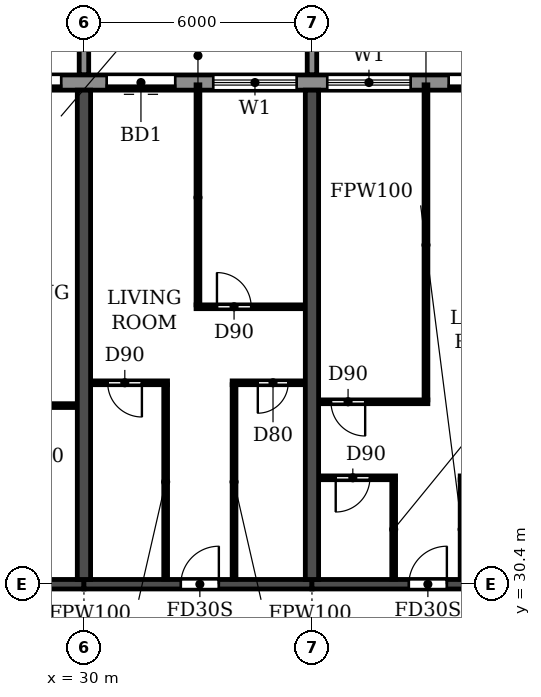
"""IFC4 building model, lengths in metres.
Left out: names, types, materials, properties, quantities, classifications, styles, units other than length and angle.
Written with IfcOpenShell. Run it as: python <this file> out.ifc"""

import sys

from ifc_helpers import new_model, si_unit, direction, frame, frame_2d, origin, place, context, subcontext, project, spatial, polyline, rectangle, outline, extrude, source, transform, mapped, element, fill, save


model = new_model("IFC4")
c1 = context("Model", 3, precision=1e-05, world=origin(), true_north=direction((0.0, 1.0)))
c2 = subcontext(c1, "Body", "Model", "MODEL_VIEW")
j1 = project(units=[si_unit("LENGTHUNIT", "METRE"), si_unit("PLANEANGLEUNIT", "RADIAN")], contexts=[c1])
p1 = place(None, origin())
s1 = spatial("IfcSite", under=j1, at=p1, CompositionType="ELEMENT")
p2 = place(p1, origin())
s2 = spatial("IfcBuilding", under=s1, at=p2, CompositionType="ELEMENT")
p3 = place(p2, frame((0.0, 0.0, 112.5)))
s3 = spatial("IfcBuildingStorey", under=s2, at=p3, CompositionType="ELEMENT", Elevation=112.5)
for number, where, z_axis, x_axis in (
    (1, (30.0, 30.525, 0.0), (0.0, 0.0, 1.0), (0.0, 1.0, 0.0)),
    (2, (36.0, 30.525, 0.0), (0.0, 0.0, 1.0), (0.0, 1.0, 0.0)),
):
    element("IfcWall", number, at=place(p3, frame(where, z_axis=z_axis, x_axis=x_axis)), inside=s3, PredefinedType="SHEAR", context=c2, shape_type="SweptSolid", body=[
        extrude(rectangle(XDim=12.875, YDim=0.35, at=frame_2d((6.438, 0.0))), origin(), (0.0, 0.0, 1.0), 2.95),
    ])
p4 = place(p3, frame((24.0, 30.4, 0.0), z_axis=(0.0, 0.0, 1.0), x_axis=(1.0, 0.0, 0.0)))
e3 = element("IfcWall", 3, at=p4, inside=s3, PredefinedType="SHEAR", context=c2, shape_type="SweptSolid", body=[
    extrude(rectangle(XDim=6.0, YDim=0.25, at=frame_2d((3.0, 0.0))), origin(), (0.0, 0.0, 1.0), 2.35),
])
p5 = place(p4, frame((2.55, 0.0, 0.0)))
e4 = element("IfcOpeningElement", 4, at=p5, cuts=e3, PredefinedType="OPENING", context=c2, shape_type="SweptSolid", body=[
    extrude(rectangle(XDim=1.0, YDim=2.1, at=frame_2d((0.5, 1.05))), frame((0.0, 0.135, 0.0), z_axis=(0.0, -1.0, 0.0), x_axis=(1.0, 0.0, 0.0)), (0.0, 0.0, 1.0), 0.27),
])
p6 = place(p3, frame((30.0, 30.4, 0.0), z_axis=(0.0, 0.0, 1.0), x_axis=(1.0, 0.0, 0.0)))
e5 = element("IfcWall", 5, at=p6, inside=s3, PredefinedType="SHEAR", context=c2, shape_type="SweptSolid", body=[
    extrude(rectangle(XDim=6.0, YDim=0.25, at=frame_2d((3.0, 0.0))), origin(), (0.0, 0.0, 1.0), 2.35),
])
p7 = place(p6, frame((2.55, 0.0, 0.0)))
e6 = element("IfcOpeningElement", 6, at=p7, cuts=e5, PredefinedType="OPENING", context=c2, shape_type="SweptSolid", body=[
    extrude(rectangle(XDim=1.0, YDim=2.1, at=frame_2d((0.5, 1.05))), frame((0.0, 0.135, 0.0), z_axis=(0.0, -1.0, 0.0), x_axis=(1.0, 0.0, 0.0)), (0.0, 0.0, 1.0), 0.27),
])
p8 = place(p3, frame((36.0, 30.4, 0.0), z_axis=(0.0, 0.0, 1.0), x_axis=(1.0, 0.0, 0.0)))
e7 = element("IfcWall", 7, at=p8, inside=s3, PredefinedType="SHEAR", context=c2, shape_type="SweptSolid", body=[
    extrude(rectangle(XDim=6.0, YDim=0.25, at=frame_2d((3.0, 0.0))), origin(), (0.0, 0.0, 1.0), 2.35),
])
p9 = place(p8, frame((2.55, 0.0, 0.0)))
e8 = element("IfcOpeningElement", 8, at=p9, cuts=e7, PredefinedType="OPENING", context=c2, shape_type="SweptSolid", body=[
    extrude(rectangle(XDim=1.0, YDim=2.1, at=frame_2d((0.5, 1.05))), frame((0.0, 0.135, 0.0), z_axis=(0.0, -1.0, 0.0), x_axis=(1.0, 0.0, 0.0)), (0.0, 0.0, 1.0), 0.27),
])
p10 = place(p3, frame((85.317, 43.6, 0.0), z_axis=(0.0, 0.0, 1.0), x_axis=(-1.0, 0.0, 0.0)))
e9 = element("IfcWall", 9, at=p10, inside=s3, PredefinedType="STANDARD", context=c2, shape_type="SweptSolid", body=[
    extrude(rectangle(XDim=68.634, YDim=0.4, at=frame_2d((34.317, 0.0))), origin(), (0.0, 0.0, 1.0), 2.95),
])
p11 = place(p10, frame((64.917, 0.0, 0.0)))
e10 = element("IfcOpeningElement", 10, at=p11, cuts=e9, PredefinedType="OPENING", context=c2, shape_type="SweptSolid", body=[
    extrude(rectangle(XDim=1.8, YDim=2.4, at=frame_2d((0.9, 1.2))), frame((0.0, 0.21, 0.0), z_axis=(0.0, -1.0, 0.0), x_axis=(1.0, 0.0, 0.0)), (0.0, 0.0, 1.0), 0.42),
])
p12 = place(p10, frame((61.717, 0.0, 0.9)))
e11 = element("IfcOpeningElement", 11, at=p12, cuts=e9, PredefinedType="OPENING", context=c2, shape_type="SweptSolid", body=[
    extrude(rectangle(XDim=2.2, YDim=1.5, at=frame_2d((1.1, 0.75))), frame((0.0, 0.21, 0.0), z_axis=(0.0, -1.0, 0.0), x_axis=(1.0, 0.0, 0.0)), (0.0, 0.0, 1.0), 0.42),
])
p13 = place(p10, frame((58.717, 0.0, 0.9)))
e12 = element("IfcOpeningElement", 12, at=p13, cuts=e9, PredefinedType="OPENING", context=c2, shape_type="SweptSolid", body=[
    extrude(rectangle(XDim=2.2, YDim=1.5, at=frame_2d((1.1, 0.75))), frame((0.0, 0.21, 0.0), z_axis=(0.0, -1.0, 0.0), x_axis=(1.0, 0.0, 0.0)), (0.0, 0.0, 1.0), 0.42),
])
p14 = place(p10, frame((55.917, 0.0, 0.0)))
e13 = element("IfcOpeningElement", 13, at=p14, cuts=e9, PredefinedType="OPENING", context=c2, shape_type="SweptSolid", body=[
    extrude(rectangle(XDim=1.8, YDim=2.4, at=frame_2d((0.9, 1.2))), frame((0.0, 0.21, 0.0), z_axis=(0.0, -1.0, 0.0), x_axis=(1.0, 0.0, 0.0)), (0.0, 0.0, 1.0), 0.42),
])
p15 = place(p10, frame((52.917, 0.0, 0.0)))
e14 = element("IfcOpeningElement", 14, at=p15, cuts=e9, PredefinedType="OPENING", context=c2, shape_type="SweptSolid", body=[
    extrude(rectangle(XDim=1.8, YDim=2.4, at=frame_2d((0.9, 1.2))), frame((0.0, 0.21, 0.0), z_axis=(0.0, -1.0, 0.0), x_axis=(1.0, 0.0, 0.0)), (0.0, 0.0, 1.0), 0.42),
])
p16 = place(p10, frame((49.717, 0.0, 0.9)))
e15 = element("IfcOpeningElement", 15, at=p16, cuts=e9, PredefinedType="OPENING", context=c2, shape_type="SweptSolid", body=[
    extrude(rectangle(XDim=2.2, YDim=1.5, at=frame_2d((1.1, 0.75))), frame((0.0, 0.21, 0.0), z_axis=(0.0, -1.0, 0.0), x_axis=(1.0, 0.0, 0.0)), (0.0, 0.0, 1.0), 0.42),
])
p17 = place(p10, frame((46.717, 0.0, 0.9)))
e16 = element("IfcOpeningElement", 16, at=p17, cuts=e9, PredefinedType="OPENING", context=c2, shape_type="SweptSolid", body=[
    extrude(rectangle(XDim=2.2, YDim=1.5, at=frame_2d((1.1, 0.75))), frame((0.0, 0.21, 0.0), z_axis=(0.0, -1.0, 0.0), x_axis=(1.0, 0.0, 0.0)), (0.0, 0.0, 1.0), 0.42),
])
p18 = place(p10, frame((43.917, 0.0, 0.0)))
e17 = element("IfcOpeningElement", 17, at=p18, cuts=e9, PredefinedType="OPENING", context=c2, shape_type="SweptSolid", body=[
    extrude(rectangle(XDim=1.8, YDim=2.4, at=frame_2d((0.9, 1.2))), frame((0.0, 0.21, 0.0), z_axis=(0.0, -1.0, 0.0), x_axis=(1.0, 0.0, 0.0)), (0.0, 0.0, 1.0), 0.42),
])
p19 = place(p10, frame((40.717, 0.0, 0.9)))
e18 = element("IfcOpeningElement", 18, at=p19, cuts=e9, PredefinedType="OPENING", context=c2, shape_type="SweptSolid", body=[
    extrude(rectangle(XDim=2.2, YDim=1.5, at=frame_2d((1.1, 0.75))), frame((0.0, 0.21, 0.0), z_axis=(0.0, -1.0, 0.0), x_axis=(1.0, 0.0, 0.0)), (0.0, 0.0, 1.0), 0.42),
])
p20 = place(p10, frame((37.717, 0.0, 0.9)))
e19 = element("IfcOpeningElement", 19, at=p20, cuts=e9, PredefinedType="OPENING", context=c2, shape_type="SweptSolid", body=[
    extrude(rectangle(XDim=2.2, YDim=1.5, at=frame_2d((1.1, 0.75))), frame((0.0, 0.21, 0.0), z_axis=(0.0, -1.0, 0.0), x_axis=(1.0, 0.0, 0.0)), (0.0, 0.0, 1.0), 0.42),
])
p21 = place(p10, frame((34.917, 0.0, 0.0)))
e20 = element("IfcOpeningElement", 20, at=p21, cuts=e9, PredefinedType="OPENING", context=c2, shape_type="SweptSolid", body=[
    extrude(rectangle(XDim=1.8, YDim=2.4, at=frame_2d((0.9, 1.2))), frame((0.0, 0.21, 0.0), z_axis=(0.0, -1.0, 0.0), x_axis=(1.0, 0.0, 0.0)), (0.0, 0.0, 1.0), 0.42),
])
p22 = place(p10, frame((31.717, 0.0, 0.9)))
e21 = element("IfcOpeningElement", 21, at=p22, cuts=e9, PredefinedType="OPENING", context=c2, shape_type="SweptSolid", body=[
    extrude(rectangle(XDim=2.2, YDim=1.5, at=frame_2d((1.1, 0.75))), frame((0.0, 0.21, 0.0), z_axis=(0.0, -1.0, 0.0), x_axis=(1.0, 0.0, 0.0)), (0.0, 0.0, 1.0), 0.42),
])
p23 = place(p10, frame((28.917, 0.0, 0.0)))
e22 = element("IfcOpeningElement", 22, at=p23, cuts=e9, PredefinedType="OPENING", context=c2, shape_type="SweptSolid", body=[
    extrude(rectangle(XDim=1.8, YDim=2.4, at=frame_2d((0.9, 1.2))), frame((0.0, 0.21, 0.0), z_axis=(0.0, -1.0, 0.0), x_axis=(1.0, 0.0, 0.0)), (0.0, 0.0, 1.0), 0.42),
])
p24 = place(p10, frame((25.717, 0.0, 0.9)))
e23 = element("IfcOpeningElement", 23, at=p24, cuts=e9, PredefinedType="OPENING", context=c2, shape_type="SweptSolid", body=[
    extrude(rectangle(XDim=2.2, YDim=1.5, at=frame_2d((1.1, 0.75))), frame((0.0, 0.21, 0.0), z_axis=(0.0, -1.0, 0.0), x_axis=(1.0, 0.0, 0.0)), (0.0, 0.0, 1.0), 0.42),
])
p25 = place(p10, frame((22.717, 0.0, 0.9)))
e24 = element("IfcOpeningElement", 24, at=p25, cuts=e9, PredefinedType="OPENING", context=c2, shape_type="SweptSolid", body=[
    extrude(rectangle(XDim=2.2, YDim=1.5, at=frame_2d((1.1, 0.75))), frame((0.0, 0.21, 0.0), z_axis=(0.0, -1.0, 0.0), x_axis=(1.0, 0.0, 0.0)), (0.0, 0.0, 1.0), 0.42),
])
p26 = place(p10, frame((19.917, 0.0, 0.0)))
e25 = element("IfcOpeningElement", 25, at=p26, cuts=e9, PredefinedType="OPENING", context=c2, shape_type="SweptSolid", body=[
    extrude(rectangle(XDim=1.8, YDim=2.4, at=frame_2d((0.9, 1.2))), frame((0.0, 0.21, 0.0), z_axis=(0.0, -1.0, 0.0), x_axis=(1.0, 0.0, 0.0)), (0.0, 0.0, 1.0), 0.42),
])
p27 = place(p10, frame((16.717, 0.0, 0.9)))
e26 = element("IfcOpeningElement", 26, at=p27, cuts=e9, PredefinedType="OPENING", context=c2, shape_type="SweptSolid", body=[
    extrude(rectangle(XDim=2.2, YDim=1.5, at=frame_2d((1.1, 0.75))), frame((0.0, 0.21, 0.0), z_axis=(0.0, -1.0, 0.0), x_axis=(1.0, 0.0, 0.0)), (0.0, 0.0, 1.0), 0.42),
])
p28 = place(p10, frame((13.917, 0.0, 0.0)))
e27 = element("IfcOpeningElement", 27, at=p28, cuts=e9, PredefinedType="OPENING", context=c2, shape_type="SweptSolid", body=[
    extrude(rectangle(XDim=1.8, YDim=2.4, at=frame_2d((0.9, 1.2))), frame((0.0, 0.21, 0.0), z_axis=(0.0, -1.0, 0.0), x_axis=(1.0, 0.0, 0.0)), (0.0, 0.0, 1.0), 0.42),
])
p29 = place(p10, frame((10.717, 0.0, 0.9)))
e28 = element("IfcOpeningElement", 28, at=p29, cuts=e9, PredefinedType="OPENING", context=c2, shape_type="SweptSolid", body=[
    extrude(rectangle(XDim=2.2, YDim=1.5, at=frame_2d((1.1, 0.75))), frame((0.0, 0.21, 0.0), z_axis=(0.0, -1.0, 0.0), x_axis=(1.0, 0.0, 0.0)), (0.0, 0.0, 1.0), 0.42),
])
p30 = place(p10, frame((7.717, 0.0, 0.9)))
e29 = element("IfcOpeningElement", 29, at=p30, cuts=e9, PredefinedType="OPENING", context=c2, shape_type="SweptSolid", body=[
    extrude(rectangle(XDim=2.2, YDim=1.5, at=frame_2d((1.1, 0.75))), frame((0.0, 0.21, 0.0), z_axis=(0.0, -1.0, 0.0), x_axis=(1.0, 0.0, 0.0)), (0.0, 0.0, 1.0), 0.42),
])
p31 = place(p10, frame((4.917, 0.0, 0.0)))
e30 = element("IfcOpeningElement", 30, at=p31, cuts=e9, PredefinedType="OPENING", context=c2, shape_type="SweptSolid", body=[
    extrude(rectangle(XDim=1.8, YDim=2.4, at=frame_2d((0.9, 1.2))), frame((0.0, 0.21, 0.0), z_axis=(0.0, -1.0, 0.0), x_axis=(1.0, 0.0, 0.0)), (0.0, 0.0, 1.0), 0.42),
])
p32 = place(p10, frame((1.717, 0.0, 0.9)))
e31 = element("IfcOpeningElement", 31, at=p32, cuts=e9, PredefinedType="OPENING", context=c2, shape_type="SweptSolid", body=[
    extrude(rectangle(XDim=2.2, YDim=1.5, at=frame_2d((1.1, 0.75))), frame((0.0, 0.21, 0.0), z_axis=(0.0, -1.0, 0.0), x_axis=(1.0, 0.0, 0.0)), (0.0, 0.0, 1.0), 0.42),
])
m1 = source(origin(), c2, "Body", "SweptSolid", [
    extrude(outline(polyline([(0.0, 0.0), (0.25, 0.0), (0.25, 3.1), (0.0, 3.1), (0.0, 0.0)])), origin(), (0.0, 0.0, 1.0), 3.1),
])
for number, where in (
    (32, (29.875, 43.8, 0.0)),
    (33, (35.875, 43.8, 0.0)),
):
    element("IfcWall", number, at=place(p3, frame(where)), inside=s3, PredefinedType="STANDARD", context=c2, shape_type="MappedRepresentation", body=[
        mapped(m1, transform((0.0, 0.0, 0.0))),
    ])
p33 = place(p3, frame((36.185, 33.2, 0.0), z_axis=(0.0, 0.0, 1.0), x_axis=(1.0, 0.0, 0.0)))
e34 = element("IfcWall", 34, at=p33, inside=s3, PredefinedType="PARTITIONING", context=c2, shape_type="SweptSolid", body=[
    extrude(rectangle(XDim=2.015, YDim=0.1, at=frame_2d((1.007, 0.0))), origin(), (0.0, 0.0, 1.0), 2.95),
])
p34 = place(p33, frame((0.44, 0.0, 0.0)))
e35 = element("IfcOpeningElement", 35, at=p34, cuts=e34, PredefinedType="OPENING", context=c2, shape_type="SweptSolid", body=[
    extrude(rectangle(XDim=0.9, YDim=2.1, at=frame_2d((0.45, 1.05))), frame((0.0, 0.06, 0.0), z_axis=(0.0, -1.0, 0.0), x_axis=(1.0, 0.0, 0.0)), (0.0, 0.0, 1.0), 0.12),
])
p35 = place(p3, frame((39.9, 33.2, 0.0), z_axis=(0.0, 0.0, 1.0), x_axis=(1.0, 0.0, 0.0)))
e36 = element("IfcWall", 36, at=p35, inside=s3, PredefinedType="PARTITIONING", context=c2, shape_type="SweptSolid", body=[
    extrude(rectangle(XDim=1.915, YDim=0.1, at=frame_2d((0.958, 0.0))), origin(), (0.0, 0.0, 1.0), 2.95),
])
p36 = place(p35, frame((0.675, 0.0, 0.0)))
e37 = element("IfcOpeningElement", 37, at=p36, cuts=e36, PredefinedType="OPENING", context=c2, shape_type="SweptSolid", body=[
    extrude(rectangle(XDim=0.8, YDim=2.1, at=frame_2d((0.4, 1.05))), frame((0.0, 0.06, 0.0), z_axis=(0.0, -1.0, 0.0), x_axis=(1.0, 0.0, 0.0)), (0.0, 0.0, 1.0), 0.12),
])
p37 = place(p3, frame((27.9, 35.1, 0.0), z_axis=(0.0, 0.0, 1.0), x_axis=(1.0, 0.0, 0.0)))
e38 = element("IfcWall", 38, at=p37, inside=s3, PredefinedType="PARTITIONING", context=c2, shape_type="SweptSolid", body=[
    extrude(rectangle(XDim=1.915, YDim=0.1, at=frame_2d((0.958, 0.0))), origin(), (0.0, 0.0, 1.0), 2.95),
])
p38 = place(p3, frame((36.185, 35.2, 0.0), z_axis=(0.0, 0.0, 1.0), x_axis=(1.0, 0.0, 0.0)))
e39 = element("IfcWall", 39, at=p38, inside=s3, PredefinedType="PARTITIONING", context=c2, shape_type="SweptSolid", body=[
    extrude(rectangle(XDim=2.865, YDim=0.1, at=frame_2d((1.433, 0.0))), origin(), (0.0, 0.0, 1.0), 2.95),
])
p39 = place(p38, frame((0.315, 0.0, 0.0)))
e40 = element("IfcOpeningElement", 40, at=p39, cuts=e39, PredefinedType="OPENING", context=c2, shape_type="SweptSolid", body=[
    extrude(rectangle(XDim=0.9, YDim=2.1, at=frame_2d((0.45, 1.05))), frame((0.0, 0.06, 0.0), z_axis=(0.0, -1.0, 0.0), x_axis=(1.0, 0.0, 0.0)), (0.0, 0.0, 1.0), 0.12),
])
p40 = place(p3, frame((30.185, 35.7, 0.0), z_axis=(0.0, 0.0, 1.0), x_axis=(1.0, 0.0, 0.0)))
e41 = element("IfcWall", 41, at=p40, inside=s3, PredefinedType="PARTITIONING", context=c2, shape_type="SweptSolid", body=[
    extrude(rectangle(XDim=2.015, YDim=0.1, at=frame_2d((1.007, 0.0))), origin(), (0.0, 0.0, 1.0), 2.95),
])
p41 = place(p40, frame((0.44, 0.0, 0.0)))
e42 = element("IfcOpeningElement", 42, at=p41, cuts=e41, PredefinedType="OPENING", context=c2, shape_type="SweptSolid", body=[
    extrude(rectangle(XDim=0.9, YDim=2.1, at=frame_2d((0.45, 1.05))), frame((0.0, 0.06, 0.0), z_axis=(0.0, -1.0, 0.0), x_axis=(1.0, 0.0, 0.0)), (0.0, 0.0, 1.0), 0.12),
])
p42 = place(p3, frame((33.9, 35.7, 0.0), z_axis=(0.0, 0.0, 1.0), x_axis=(1.0, 0.0, 0.0)))
e43 = element("IfcWall", 43, at=p42, inside=s3, PredefinedType="PARTITIONING", context=c2, shape_type="SweptSolid", body=[
    extrude(rectangle(XDim=1.915, YDim=0.1, at=frame_2d((0.958, 0.0))), origin(), (0.0, 0.0, 1.0), 2.95),
])
p43 = place(p42, frame((0.675, 0.0, 0.0)))
e44 = element("IfcOpeningElement", 44, at=p43, cuts=e43, PredefinedType="OPENING", context=c2, shape_type="SweptSolid", body=[
    extrude(rectangle(XDim=0.8, YDim=2.1, at=frame_2d((0.4, 1.05))), frame((0.0, 0.06, 0.0), z_axis=(0.0, -1.0, 0.0), x_axis=(1.0, 0.0, 0.0)), (0.0, 0.0, 1.0), 0.12),
])
p44 = place(p3, frame((32.95, 37.7, 0.0), z_axis=(0.0, 0.0, 1.0), x_axis=(1.0, 0.0, 0.0)))
e45 = element("IfcWall", 45, at=p44, inside=s3, PredefinedType="PARTITIONING", context=c2, shape_type="SweptSolid", body=[
    extrude(rectangle(XDim=2.865, YDim=0.1, at=frame_2d((1.433, 0.0))), origin(), (0.0, 0.0, 1.0), 2.95),
])
p45 = place(p44, frame((0.55, 0.0, 0.0)))
e46 = element("IfcOpeningElement", 46, at=p45, cuts=e45, PredefinedType="OPENING", context=c2, shape_type="SweptSolid", body=[
    extrude(rectangle(XDim=0.9, YDim=2.1, at=frame_2d((0.45, 1.05))), frame((0.0, 0.06, 0.0), z_axis=(0.0, -1.0, 0.0), x_axis=(1.0, 0.0, 0.0)), (0.0, 0.0, 1.0), 0.12),
])
p46 = place(p3, frame((32.15, 30.535, 0.0), z_axis=(0.0, 0.0, 1.0), x_axis=(0.0, 1.0, 0.0)))
e47 = element("IfcWall", 47, at=p46, inside=s3, PredefinedType="PARTITIONING", context=c2, shape_type="SweptSolid", body=[
    extrude(rectangle(XDim=5.115, YDim=0.1, at=frame_2d((2.558, 0.0))), origin(), (0.0, 0.0, 1.0), 2.95),
])
p47 = place(p3, frame((33.0, 37.75, 0.0), z_axis=(0.0, 0.0, 1.0), x_axis=(0.0, 1.0, 0.0)))
e48 = element("IfcWall", 48, at=p47, inside=s3, PredefinedType="PARTITIONING", context=c2, shape_type="SweptSolid", body=[
    extrude(rectangle(XDim=5.79, YDim=0.1, at=frame_2d((2.895, 0.0))), origin(), (0.0, 0.0, 1.0), 2.95),
])
p48 = place(p3, frame((33.95, 30.535, 0.0), z_axis=(0.0, 0.0, 1.0), x_axis=(0.0, 1.0, 0.0)))
e49 = element("IfcWall", 49, at=p48, inside=s3, PredefinedType="PARTITIONING", context=c2, shape_type="SweptSolid", body=[
    extrude(rectangle(XDim=5.115, YDim=0.1, at=frame_2d((2.558, 0.0))), origin(), (0.0, 0.0, 1.0), 2.95),
])
p49 = place(p3, frame((38.15, 30.535, 0.0), z_axis=(0.0, 0.0, 1.0), x_axis=(0.0, 1.0, 0.0)))
e50 = element("IfcWall", 50, at=p49, inside=s3, PredefinedType="PARTITIONING", context=c2, shape_type="SweptSolid", body=[
    extrude(rectangle(XDim=2.615, YDim=0.1, at=frame_2d((1.308, 0.0))), origin(), (0.0, 0.0, 1.0), 2.95),
])
p50 = place(p3, frame((39.0, 35.25, 0.0), z_axis=(0.0, 0.0, 1.0), x_axis=(0.0, 1.0, 0.0)))
e51 = element("IfcWall", 51, at=p50, inside=s3, PredefinedType="PARTITIONING", context=c2, shape_type="SweptSolid", body=[
    extrude(rectangle(XDim=8.29, YDim=0.1, at=frame_2d((4.145, 0.0))), origin(), (0.0, 0.0, 1.0), 2.95),
])
p51 = place(p3, frame((39.95, 30.535, 0.0), z_axis=(0.0, 0.0, 1.0), x_axis=(0.0, 1.0, 0.0)))
e52 = element("IfcWall", 52, at=p51, inside=s3, PredefinedType="PARTITIONING", context=c2, shape_type="SweptSolid", body=[
    extrude(rectangle(XDim=2.615, YDim=0.1, at=frame_2d((1.308, 0.0))), origin(), (0.0, 0.0, 1.0), 2.95),
])
p52 = place(p14, origin())
e53 = element("IfcDoor", 53, at=p52, inside=s3, OperationType="DOUBLE_DOOR_SLIDING", PredefinedType="DOOR", context=c2, shape_type="SweptSolid", body=[
    extrude(rectangle(XDim=1.8, YDim=2.4, at=frame_2d((0.9, 1.2))), frame((0.0, 0.025, 0.0), z_axis=(0.0, -1.0, 0.0), x_axis=(1.0, 0.0, 0.0)), (0.0, 0.0, 1.0), 0.05),
])
fill(e13, e53)
p53 = place(p15, origin())
e54 = element("IfcDoor", 54, at=p53, inside=s3, OperationType="DOUBLE_DOOR_SLIDING", PredefinedType="DOOR", context=c2, shape_type="SweptSolid", body=[
    extrude(rectangle(XDim=1.8, YDim=2.4, at=frame_2d((0.9, 1.2))), frame((0.0, 0.025, 0.0), z_axis=(0.0, -1.0, 0.0), x_axis=(1.0, 0.0, 0.0)), (0.0, 0.0, 1.0), 0.05),
])
fill(e14, e54)
p54 = place(p16, origin())
e55 = element("IfcWindow", 55, at=p54, inside=s3, PartitioningType="DOUBLE_PANEL_HORIZONTAL", PredefinedType="WINDOW", context=c2, shape_type="SweptSolid", body=[
    extrude(rectangle(XDim=2.2, YDim=1.5, at=frame_2d((1.1, 0.75))), frame((0.0, 0.03, 0.0), z_axis=(0.0, -1.0, 0.0), x_axis=(1.0, 0.0, 0.0)), (0.0, 0.0, 1.0), 0.06),
])
fill(e15, e55)
p55 = place(p17, origin())
e56 = element("IfcWindow", 56, at=p55, inside=s3, PartitioningType="DOUBLE_PANEL_HORIZONTAL", PredefinedType="WINDOW", context=c2, shape_type="SweptSolid", body=[
    extrude(rectangle(XDim=2.2, YDim=1.5, at=frame_2d((1.1, 0.75))), frame((0.0, 0.03, 0.0), z_axis=(0.0, -1.0, 0.0), x_axis=(1.0, 0.0, 0.0)), (0.0, 0.0, 1.0), 0.06),
])
fill(e16, e56)
p56 = place(p18, origin())
e57 = element("IfcDoor", 57, at=p56, inside=s3, OperationType="DOUBLE_DOOR_SLIDING", PredefinedType="DOOR", context=c2, shape_type="SweptSolid", body=[
    extrude(rectangle(XDim=1.8, YDim=2.4, at=frame_2d((0.9, 1.2))), frame((0.0, 0.025, 0.0), z_axis=(0.0, -1.0, 0.0), x_axis=(1.0, 0.0, 0.0)), (0.0, 0.0, 1.0), 0.05),
])
fill(e17, e57)
p57 = place(p41, frame((0.9, 0.0, 0.0), z_axis=(0.0, 0.0, 1.0), x_axis=(-1.0, 0.0, 0.0)))
e58 = element("IfcDoor", 58, at=p57, inside=s3, OperationType="SINGLE_SWING_LEFT", PredefinedType="DOOR", context=c2, shape_type="SweptSolid", body=[
    extrude(rectangle(XDim=0.9, YDim=2.1, at=frame_2d((0.45, 1.05))), frame((0.0, 0.025, 0.0), z_axis=(0.0, -1.0, 0.0), x_axis=(1.0, 0.0, 0.0)), (0.0, 0.0, 1.0), 0.05),
])
fill(e42, e58)
p58 = place(p7, origin())
e59 = element("IfcDoor", 59, at=p58, inside=s3, OperationType="SINGLE_SWING_RIGHT", PredefinedType="DOOR", context=c2, shape_type="SweptSolid", body=[
    extrude(rectangle(XDim=1.0, YDim=2.1, at=frame_2d((0.5, 1.05))), frame((0.0, 0.025, 0.0), z_axis=(0.0, -1.0, 0.0), x_axis=(1.0, 0.0, 0.0)), (0.0, 0.0, 1.0), 0.05),
])
fill(e6, e59)
p59 = place(p45, origin())
e60 = element("IfcDoor", 60, at=p59, inside=s3, OperationType="SINGLE_SWING_LEFT", PredefinedType="DOOR", context=c2, shape_type="SweptSolid", body=[
    extrude(rectangle(XDim=0.9, YDim=2.1, at=frame_2d((0.45, 1.05))), frame((0.0, 0.025, 0.0), z_axis=(0.0, -1.0, 0.0), x_axis=(1.0, 0.0, 0.0)), (0.0, 0.0, 1.0), 0.05),
])
fill(e46, e60)
p60 = place(p43, frame((0.8, 0.0, 0.0), z_axis=(0.0, 0.0, 1.0), x_axis=(-1.0, 0.0, 0.0)))
e61 = element("IfcDoor", 61, at=p60, inside=s3, OperationType="SINGLE_SWING_RIGHT", PredefinedType="DOOR", context=c2, shape_type="SweptSolid", body=[
    extrude(rectangle(XDim=0.8, YDim=2.1, at=frame_2d((0.4, 1.05))), frame((0.0, 0.025, 0.0), z_axis=(0.0, -1.0, 0.0), x_axis=(1.0, 0.0, 0.0)), (0.0, 0.0, 1.0), 0.05),
])
fill(e44, e61)
p61 = place(p39, frame((0.9, 0.0, 0.0), z_axis=(0.0, 0.0, 1.0), x_axis=(-1.0, 0.0, 0.0)))
e62 = element("IfcDoor", 62, at=p61, inside=s3, OperationType="SINGLE_SWING_LEFT", PredefinedType="DOOR", context=c2, shape_type="SweptSolid", body=[
    extrude(rectangle(XDim=0.9, YDim=2.1, at=frame_2d((0.45, 1.05))), frame((0.0, 0.025, 0.0), z_axis=(0.0, -1.0, 0.0), x_axis=(1.0, 0.0, 0.0)), (0.0, 0.0, 1.0), 0.05),
])
fill(e40, e62)
p62 = place(p34, frame((0.9, 0.0, 0.0), z_axis=(0.0, 0.0, 1.0), x_axis=(-1.0, 0.0, 0.0)))
e63 = element("IfcDoor", 63, at=p62, inside=s3, OperationType="SINGLE_SWING_RIGHT", PredefinedType="DOOR", context=c2, shape_type="SweptSolid", body=[
    extrude(rectangle(XDim=0.9, YDim=2.1, at=frame_2d((0.45, 1.05))), frame((0.0, 0.025, 0.0), z_axis=(0.0, -1.0, 0.0), x_axis=(1.0, 0.0, 0.0)), (0.0, 0.0, 1.0), 0.05),
])
fill(e35, e63)
p63 = place(p9, origin())
e64 = element("IfcDoor", 64, at=p63, inside=s3, OperationType="SINGLE_SWING_RIGHT", PredefinedType="DOOR", context=c2, shape_type="SweptSolid", body=[
    extrude(rectangle(XDim=1.0, YDim=2.1, at=frame_2d((0.5, 1.05))), frame((0.0, 0.025, 0.0), z_axis=(0.0, -1.0, 0.0), x_axis=(1.0, 0.0, 0.0)), (0.0, 0.0, 1.0), 0.05),
])
fill(e8, e64)
save(model, sys.argv[1])
